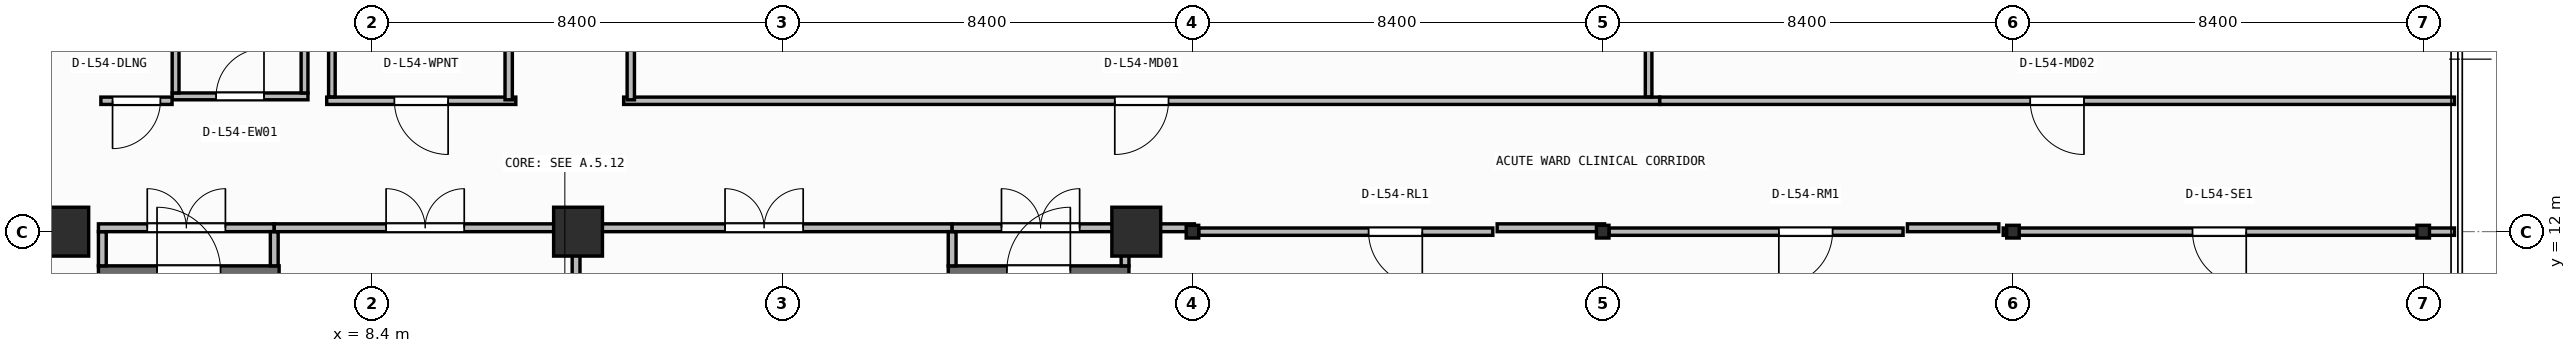
"""IFC4 building model, lengths in metres.
Left out: names, types, materials, properties, quantities, classifications, styles, units other than length and angle.
Written with IfcOpenShell. Run it as: python <this file> out.ifc"""

import sys

from ifc_helpers import new_model, si_unit, direction, frame, frame_2d, origin, origin_2d, place, context, subcontext, project, spatial, rectangle, i_section, extrude, element, fill, save


model = new_model("IFC4")
c1 = context("Model", 3, precision=1e-05, world=origin(), true_north=direction((0.0, 1.0)))
c2 = subcontext(c1, "Body", "Model", "MODEL_VIEW")
j1 = project(units=[si_unit("LENGTHUNIT", "METRE"), si_unit("PLANEANGLEUNIT", "RADIAN")], contexts=[c1])
p1 = place(None, origin())
s1 = spatial("IfcSite", under=j1, at=p1, CompositionType="ELEMENT")
p2 = place(p1, origin())
s2 = spatial("IfcBuilding", under=s1, at=p2, CompositionType="ELEMENT")
p3 = place(p2, frame((0.0, 0.0, 219.75)))
s3 = spatial("IfcBuildingStorey", under=s2, at=p3, CompositionType="ELEMENT", Elevation=219.75)
for number, where, z_axis, x_axis in (
    (1, (2.1, 12.0, 0.0), (0.0, 0.0, 1.0), (1.0, 0.0, 0.0)),
    (2, (12.62, 12.0, 0.0), (0.0, 0.0, 1.0), (1.0, 0.0, 0.0)),
    (3, (24.05, 12.0, 0.0), (0.0, 0.0, 1.0), (1.0, 0.0, 0.0)),
):
    element("IfcColumn", number, at=place(p3, frame(where, z_axis=z_axis, x_axis=x_axis)), inside=s3, PredefinedType="COLUMN", context=c2, shape_type="SweptSolid", body=[
        extrude(rectangle(XDim=1.0, YDim=1.0, at=origin_2d()), origin(), (0.0, 0.0, 1.0), 3.95),
    ])
for number, where, z_axis, x_axis in (
    (4, (25.2, 12.0, 0.0), (0.0, 0.0, 1.0), (1.0, 0.0, 0.0)),
    (5, (33.6, 12.0, 0.0), (0.0, 0.0, 1.0), (1.0, 0.0, 0.0)),
    (6, (42.0, 12.0, 0.0), (0.0, 0.0, 1.0), (1.0, 0.0, 0.0)),
    (7, (50.4, 12.0, 0.0), (0.0, 0.0, 1.0), (1.0, 0.0, 0.0)),
):
    element("IfcColumn", number, at=place(p3, frame(where, z_axis=z_axis, x_axis=x_axis)), inside=s3, PredefinedType="COLUMN", context=c2, shape_type="SweptSolid", body=[
        extrude(i_section(OverallWidth=0.256, OverallDepth=0.26, WebThickness=0.01, FlangeThickness=0.017, FilletRadius=0.013, at=origin_2d()), origin(), (0.0, 0.0, 1.0), 3.95),
    ])
p4 = place(p3, frame((2.8, 11.2, 0.0), z_axis=(0.0, 0.0, 1.0), x_axis=(1.0, 0.0, 0.0)))
e8 = element("IfcWall", 8, at=p4, inside=s3, PredefinedType="SHEAR", context=c2, shape_type="SweptSolid", body=[
    extrude(rectangle(XDim=3.7, YDim=0.2, at=frame_2d((1.85, 0.0))), origin(), (0.0, 0.0, 1.0), 3.71),
])
p5 = place(p4, frame((1.2, 0.0, 0.0)))
e9 = element("IfcOpeningElement", 9, at=p5, cuts=e8, PredefinedType="OPENING", context=c2, shape_type="SweptSolid", body=[
    extrude(rectangle(XDim=1.3, YDim=2.15, at=frame_2d((0.65, 1.075))), frame((0.0, 0.11, 0.0), z_axis=(0.0, -1.0, 0.0), x_axis=(1.0, 0.0, 0.0)), (0.0, 0.0, 1.0), 0.22),
])
p6 = place(p3, frame((20.2, 11.2, 0.0), z_axis=(0.0, 0.0, 1.0), x_axis=(1.0, 0.0, 0.0)))
e10 = element("IfcWall", 10, at=p6, inside=s3, PredefinedType="SHEAR", context=c2, shape_type="SweptSolid", body=[
    extrude(rectangle(XDim=3.7, YDim=0.2, at=frame_2d((1.85, 0.0))), origin(), (0.0, 0.0, 1.0), 3.71),
])
p7 = place(p6, frame((1.2, 0.0, 0.0)))
e11 = element("IfcOpeningElement", 11, at=p7, cuts=e10, PredefinedType="OPENING", context=c2, shape_type="SweptSolid", body=[
    extrude(rectangle(XDim=1.3, YDim=2.15, at=frame_2d((0.65, 1.075))), frame((0.0, 0.11, 0.0), z_axis=(0.0, -1.0, 0.0), x_axis=(1.0, 0.0, 0.0)), (0.0, 0.0, 1.0), 0.22),
])
p8 = place(p3, frame((2.88, 11.3, 0.0), z_axis=(0.0, 0.0, 1.0), x_axis=(0.0, 1.0, 0.0)))
e12 = element("IfcWall", 12, at=p8, inside=s3, PredefinedType="PARTITIONING", context=c2, shape_type="SweptSolid", body=[
    extrude(rectangle(XDim=0.7, YDim=0.16, at=frame_2d((0.35, 0.0))), origin(), (0.0, 0.0, 1.0), 3.71),
])
p9 = place(p3, frame((2.8, 12.08, 0.0), z_axis=(0.0, 0.0, 1.0), x_axis=(1.0, 0.0, 0.0)))
e13 = element("IfcWall", 13, at=p9, inside=s3, PredefinedType="PARTITIONING", context=c2, shape_type="SweptSolid", body=[
    extrude(rectangle(XDim=3.6, YDim=0.16, at=frame_2d((1.8, 0.0))), origin(), (0.0, 0.0, 1.0), 3.152),
])
p10 = place(p9, frame((1.0, 0.0, 0.0)))
e14 = element("IfcOpeningElement", 14, at=p10, cuts=e13, PredefinedType="OPENING", context=c2, shape_type="SweptSolid", body=[
    extrude(rectangle(XDim=1.6, YDim=2.05, at=frame_2d((0.8, 1.025))), frame((0.0, 0.09, 0.0), z_axis=(0.0, -1.0, 0.0), x_axis=(1.0, 0.0, 0.0)), (0.0, 0.0, 1.0), 0.18),
])
p11 = place(p3, frame((6.4, 11.3, 0.0), z_axis=(0.0, 0.0, 1.0), x_axis=(0.0, 1.0, 0.0)))
e15 = element("IfcWall", 15, at=p11, inside=s3, PredefinedType="PARTITIONING", context=c2, shape_type="SweptSolid", body=[
    extrude(rectangle(XDim=0.7, YDim=0.16, at=frame_2d((0.35, 0.0))), origin(), (0.0, 0.0, 1.0), 3.71),
])
p12 = place(p3, frame((6.4, 12.08, 0.0), z_axis=(0.0, 0.0, 1.0), x_axis=(1.0, 0.0, 0.0)))
e16 = element("IfcWall", 16, at=p12, inside=s3, PredefinedType="PARTITIONING", context=c2, shape_type="SweptSolid", body=[
    extrude(rectangle(XDim=6.18, YDim=0.16, at=frame_2d((3.09, 0.0))), origin(), (0.0, 0.0, 1.0), 3.152),
])
p13 = place(p12, frame((2.29, 0.0, 0.0)))
e17 = element("IfcOpeningElement", 17, at=p13, cuts=e16, PredefinedType="OPENING", context=c2, shape_type="SweptSolid", body=[
    extrude(rectangle(XDim=1.6, YDim=2.05, at=frame_2d((0.8, 1.025))), frame((0.0, 0.09, 0.0), z_axis=(0.0, -1.0, 0.0), x_axis=(1.0, 0.0, 0.0)), (0.0, 0.0, 1.0), 0.18),
])
p14 = place(p3, frame((12.58, 9.21, 0.0), z_axis=(0.0, 0.0, 1.0), x_axis=(0.0, 1.0, 0.0)))
e18 = element("IfcWall", 18, at=p14, inside=s3, PredefinedType="PARTITIONING", context=c2, shape_type="SweptSolid", body=[
    extrude(rectangle(XDim=2.79, YDim=0.16, at=frame_2d((1.395, 0.0))), origin(), (0.0, 0.0, 1.0), 3.71),
])
p15 = place(p3, frame((12.58, 12.08, 0.0), z_axis=(0.0, 0.0, 1.0), x_axis=(1.0, 0.0, 0.0)))
e19 = element("IfcWall", 19, at=p15, inside=s3, PredefinedType="PARTITIONING", context=c2, shape_type="SweptSolid", body=[
    extrude(rectangle(XDim=7.7, YDim=0.16, at=frame_2d((3.85, 0.0))), origin(), (0.0, 0.0, 1.0), 3.152),
])
p16 = place(p15, frame((3.05, 0.0, 0.0)))
e20 = element("IfcOpeningElement", 20, at=p16, cuts=e19, PredefinedType="OPENING", context=c2, shape_type="SweptSolid", body=[
    extrude(rectangle(XDim=1.6, YDim=2.05, at=frame_2d((0.8, 1.025))), frame((0.0, 0.09, 0.0), z_axis=(0.0, -1.0, 0.0), x_axis=(1.0, 0.0, 0.0)), (0.0, 0.0, 1.0), 0.18),
])
p17 = place(p3, frame((20.28, 11.3, 0.0), z_axis=(0.0, 0.0, 1.0), x_axis=(0.0, 1.0, 0.0)))
e21 = element("IfcWall", 21, at=p17, inside=s3, PredefinedType="PARTITIONING", context=c2, shape_type="SweptSolid", body=[
    extrude(rectangle(XDim=0.7, YDim=0.16, at=frame_2d((0.35, 0.0))), origin(), (0.0, 0.0, 1.0), 3.71),
])
p18 = place(p3, frame((20.28, 12.08, 0.0), z_axis=(0.0, 0.0, 1.0), x_axis=(1.0, 0.0, 0.0)))
e22 = element("IfcWall", 22, at=p18, inside=s3, PredefinedType="PARTITIONING", context=c2, shape_type="SweptSolid", body=[
    extrude(rectangle(XDim=3.62, YDim=0.16, at=frame_2d((1.81, 0.0))), origin(), (0.0, 0.0, 1.0), 3.152),
])
p19 = place(p18, frame((1.01, 0.0, 0.0)))
e23 = element("IfcOpeningElement", 23, at=p19, cuts=e22, PredefinedType="OPENING", context=c2, shape_type="SweptSolid", body=[
    extrude(rectangle(XDim=1.6, YDim=2.05, at=frame_2d((0.8, 1.025))), frame((0.0, 0.09, 0.0), z_axis=(0.0, -1.0, 0.0), x_axis=(1.0, 0.0, 0.0)), (0.0, 0.0, 1.0), 0.18),
])
p20 = place(p3, frame((23.82, 11.3, 0.0), z_axis=(0.0, 0.0, 1.0), x_axis=(0.0, 1.0, 0.0)))
e24 = element("IfcWall", 24, at=p20, inside=s3, PredefinedType="PARTITIONING", context=c2, shape_type="SweptSolid", body=[
    extrude(rectangle(XDim=0.7, YDim=0.16, at=frame_2d((0.35, 0.0))), origin(), (0.0, 0.0, 1.0), 3.71),
])
p21 = place(p3, frame((4.31, 14.77, 0.0), z_axis=(0.0, 0.0, 1.0), x_axis=(1.0, 0.0, 0.0)))
e25 = element("IfcWall", 25, at=p21, inside=s3, PredefinedType="PARTITIONING", context=c2, shape_type="SweptSolid", body=[
    extrude(rectangle(XDim=2.78, YDim=0.14, at=frame_2d((1.39, 0.0))), origin(), (0.0, 0.0, 1.0), 3.71),
])
p22 = place(p21, frame((0.9, 0.0, 0.0)))
e26 = element("IfcOpeningElement", 26, at=p22, cuts=e25, PredefinedType="OPENING", context=c2, shape_type="SweptSolid", body=[
    extrude(rectangle(XDim=0.98, YDim=2.1, at=frame_2d((0.49, 1.05))), frame((0.0, 0.08, 0.0), z_axis=(0.0, -1.0, 0.0), x_axis=(1.0, 0.0, 0.0)), (0.0, 0.0, 1.0), 0.16),
])
for number, where, z_axis, x_axis in (
    (27, (4.38, 14.84, 0.0), (0.0, 0.0, 1.0), (0.0, 1.0, 0.0)),
    (28, (7.02, 14.84, 0.0), (0.0, 0.0, 1.0), (0.0, 1.0, 0.0)),
):
    element("IfcWall", number, at=place(p3, frame(where, z_axis=z_axis, x_axis=x_axis)), inside=s3, PredefinedType="PARTITIONING", context=c2, shape_type="SweptSolid", body=[
        extrude(rectangle(XDim=2.2, YDim=0.14, at=frame_2d((1.1, 0.0))), origin(), (0.0, 0.0, 1.0), 3.71),
    ])
p23 = place(p3, frame((31.35, 12.0, 0.0), z_axis=(0.0, 0.0, 1.0), x_axis=(-1.0, 0.0, 0.0)))
e29 = element("IfcWall", 29, at=p23, inside=s3, PredefinedType="PARTITIONING", context=c2, shape_type="SweptSolid", body=[
    extrude(rectangle(XDim=6.022, YDim=0.15, at=frame_2d((3.011, 0.0))), origin(), (0.0, 0.0, 1.0), 3.152),
])
p24 = place(p23, frame((1.444, 0.0, 0.0)))
e30 = element("IfcOpeningElement", 30, at=p24, cuts=e29, PredefinedType="OPENING", context=c2, shape_type="SweptSolid", body=[
    extrude(rectangle(XDim=1.1, YDim=2.1, at=frame_2d((0.55, 1.05))), frame((0.0, 0.085, 0.0), z_axis=(0.0, -1.0, 0.0), x_axis=(1.0, 0.0, 0.0)), (0.0, 0.0, 1.0), 0.17),
])
p25 = place(p3, frame((39.75, 12.0, 0.0), z_axis=(0.0, 0.0, 1.0), x_axis=(-1.0, 0.0, 0.0)))
e31 = element("IfcWall", 31, at=p25, inside=s3, PredefinedType="PARTITIONING", context=c2, shape_type="SweptSolid", body=[
    extrude(rectangle(XDim=6.022, YDim=0.15, at=frame_2d((3.011, 0.0))), origin(), (0.0, 0.0, 1.0), 3.152),
])
p26 = place(p25, frame((1.444, 0.0, 0.0)))
e32 = element("IfcOpeningElement", 32, at=p26, cuts=e31, PredefinedType="OPENING", context=c2, shape_type="SweptSolid", body=[
    extrude(rectangle(XDim=1.1, YDim=2.1, at=frame_2d((0.55, 1.05))), frame((0.0, 0.085, 0.0), z_axis=(0.0, -1.0, 0.0), x_axis=(1.0, 0.0, 0.0)), (0.0, 0.0, 1.0), 0.17),
])
p27 = place(p3, frame((51.04, 12.0, 0.0), z_axis=(0.0, 0.0, 1.0), x_axis=(-1.0, 0.0, 0.0)))
e33 = element("IfcWall", 33, at=p27, inside=s3, PredefinedType="PARTITIONING", context=c2, shape_type="SweptSolid", body=[
    extrude(rectangle(XDim=9.24, YDim=0.15, at=frame_2d((4.62, 0.0))), origin(), (0.0, 0.0, 1.0), 3.152),
])
p28 = place(p27, frame((4.263, 0.0, 0.0)))
e34 = element("IfcOpeningElement", 34, at=p28, cuts=e33, PredefinedType="OPENING", context=c2, shape_type="SweptSolid", body=[
    extrude(rectangle(XDim=1.1, YDim=2.1, at=frame_2d((0.55, 1.05))), frame((0.0, 0.085, 0.0), z_axis=(0.0, -1.0, 0.0), x_axis=(1.0, 0.0, 0.0)), (0.0, 0.0, 1.0), 0.17),
])
p29 = place(p3, frame((4.308, 14.68, 0.0), z_axis=(0.0, 0.0, 1.0), x_axis=(-1.0, 0.0, 0.0)))
e35 = element("IfcWall", 35, at=p29, inside=s3, PredefinedType="PARTITIONING", context=c2, shape_type="SweptSolid", body=[
    extrude(rectangle(XDim=1.458, YDim=0.15, at=frame_2d((0.729, 0.0))), origin(), (0.0, 0.0, 1.0), 3.71),
])
p30 = place(p29, frame((0.239, 0.0, 0.0)))
e36 = element("IfcOpeningElement", 36, at=p30, cuts=e35, PredefinedType="OPENING", context=c2, shape_type="SweptSolid", body=[
    extrude(rectangle(XDim=0.98, YDim=2.1, at=frame_2d((0.49, 1.05))), frame((0.0, 0.085, 0.0), z_axis=(0.0, -1.0, 0.0), x_axis=(1.0, 0.0, 0.0)), (0.0, 0.0, 1.0), 0.17),
])
p31 = place(p3, frame((11.346, 14.68, 0.0), z_axis=(0.0, 0.0, 1.0), x_axis=(-1.0, 0.0, 0.0)))
e37 = element("IfcWall", 37, at=p31, inside=s3, PredefinedType="PARTITIONING", context=c2, shape_type="SweptSolid", body=[
    extrude(rectangle(XDim=3.872, YDim=0.15, at=frame_2d((1.936, 0.0))), origin(), (0.0, 0.0, 1.0), 3.71),
])
p32 = place(p31, frame((1.386, 0.0, 0.0)))
e38 = element("IfcOpeningElement", 38, at=p32, cuts=e37, PredefinedType="OPENING", context=c2, shape_type="SweptSolid", body=[
    extrude(rectangle(XDim=1.1, YDim=2.1, at=frame_2d((0.55, 1.05))), frame((0.0, 0.085, 0.0), z_axis=(0.0, -1.0, 0.0), x_axis=(1.0, 0.0, 0.0)), (0.0, 0.0, 1.0), 0.17),
])
p33 = place(p3, frame((34.766, 14.68, 0.0), z_axis=(0.0, 0.0, 1.0), x_axis=(-1.0, 0.0, 0.0)))
e39 = element("IfcWall", 39, at=p33, inside=s3, PredefinedType="PARTITIONING", context=c2, shape_type="SweptSolid", body=[
    extrude(rectangle(XDim=21.212, YDim=0.15, at=frame_2d((10.606, 0.0))), origin(), (0.0, 0.0, 1.0), 3.71),
])
p34 = place(p33, frame((10.056, 0.0, 0.0)))
e40 = element("IfcOpeningElement", 40, at=p34, cuts=e39, PredefinedType="OPENING", context=c2, shape_type="SweptSolid", body=[
    extrude(rectangle(XDim=1.1, YDim=2.1, at=frame_2d((0.55, 1.05))), frame((0.0, 0.085, 0.0), z_axis=(0.0, -1.0, 0.0), x_axis=(1.0, 0.0, 0.0)), (0.0, 0.0, 1.0), 0.17),
])
p35 = place(p3, frame((51.04, 14.68, 0.0), z_axis=(0.0, 0.0, 1.0), x_axis=(-1.0, 0.0, 0.0)))
e41 = element("IfcWall", 41, at=p35, inside=s3, PredefinedType="PARTITIONING", context=c2, shape_type="SweptSolid", body=[
    extrude(rectangle(XDim=16.272, YDim=0.15, at=frame_2d((8.136, 0.0))), origin(), (0.0, 0.0, 1.0), 3.71),
])
p36 = place(p35, frame((7.586, 0.0, 0.0)))
e42 = element("IfcOpeningElement", 42, at=p36, cuts=e41, PredefinedType="OPENING", context=c2, shape_type="SweptSolid", body=[
    extrude(rectangle(XDim=1.1, YDim=2.1, at=frame_2d((0.55, 1.05))), frame((0.0, 0.085, 0.0), z_axis=(0.0, -1.0, 0.0), x_axis=(1.0, 0.0, 0.0)), (0.0, 0.0, 1.0), 0.17),
])
p37 = place(p3, frame((11.2, 26.6, 0.0), z_axis=(0.0, 0.0, 1.0), x_axis=(0.0, -1.0, 0.0)))
e43 = element("IfcWall", 43, at=p37, inside=s3, PredefinedType="PARTITIONING", context=c2, shape_type="SweptSolid", body=[
    extrude(rectangle(XDim=11.9, YDim=0.15, at=frame_2d((5.95, 0.0))), origin(), (0.0, 0.0, 1.0), 3.71),
])
p38 = place(p3, frame((13.7, 14.7, 0.0), z_axis=(0.0, 0.0, 1.0), x_axis=(0.0, 1.0, 0.0)))
e44 = element("IfcWall", 44, at=p38, inside=s3, PredefinedType="PARTITIONING", context=c2, shape_type="SweptSolid", body=[
    extrude(rectangle(XDim=5.326, YDim=0.15, at=frame_2d((2.663, 0.0))), origin(), (0.0, 0.0, 1.0), 3.71),
])
p39 = place(p3, frame((7.58, 14.76, 0.0), z_axis=(0.0, 0.0, 1.0), x_axis=(0.0, 1.0, 0.0)))
e45 = element("IfcWall", 45, at=p39, inside=s3, PredefinedType="PARTITIONING", context=c2, shape_type="SweptSolid", body=[
    extrude(rectangle(XDim=11.76, YDim=0.135, at=frame_2d((5.88, 0.0))), origin(), (0.0, 0.0, 1.0), 3.71),
])
p40 = place(p3, frame((34.54, 14.76, 0.0), z_axis=(0.0, 0.0, 1.0), x_axis=(0.0, 1.0, 0.0)))
e46 = element("IfcWall", 46, at=p40, inside=s3, PredefinedType="PARTITIONING", context=c2, shape_type="SweptSolid", body=[
    extrude(rectangle(XDim=5.04, YDim=0.135, at=frame_2d((2.52, 0.0))), origin(), (0.0, 0.0, 1.0), 3.71),
])
p41 = place(p3, frame((24.02, 12.08, 0.0), z_axis=(0.0, 0.0, 1.0), x_axis=(1.0, 0.0, 0.0)))
e47 = element("IfcWall", 47, at=p41, inside=s3, PredefinedType="PARTITIONING", context=c2, shape_type="SweptSolid", body=[
    extrude(rectangle(XDim=1.219, YDim=0.16, at=frame_2d((0.609, 0.0))), origin(), (0.0, 0.0, 1.0), 3.152),
])
p42 = place(p3, frame((31.439, 12.08, 0.0), z_axis=(0.0, 0.0, 1.0), x_axis=(1.0, 0.0, 0.0)))
e48 = element("IfcWall", 48, at=p42, inside=s3, PredefinedType="PARTITIONING", context=c2, shape_type="SweptSolid", body=[
    extrude(rectangle(XDim=2.199, YDim=0.16, at=frame_2d((1.1, 0.0))), origin(), (0.0, 0.0, 1.0), 3.152),
])
p43 = place(p3, frame((39.839, 12.08, 0.0), z_axis=(0.0, 0.0, 1.0), x_axis=(1.0, 0.0, 0.0)))
e49 = element("IfcWall", 49, at=p43, inside=s3, PredefinedType="PARTITIONING", context=c2, shape_type="SweptSolid", body=[
    extrude(rectangle(XDim=1.871, YDim=0.16, at=frame_2d((0.936, 0.0))), origin(), (0.0, 0.0, 1.0), 3.152),
])
p44 = place(p5, origin())
e50 = element("IfcDoor", 50, at=p44, inside=s3, OperationType="SINGLE_SWING_LEFT", PredefinedType="DOOR", context=c2, shape_type="SweptSolid", body=[
    extrude(rectangle(XDim=1.3, YDim=2.15, at=frame_2d((0.65, 1.075))), frame((0.0, 0.025, 0.0), z_axis=(0.0, -1.0, 0.0), x_axis=(1.0, 0.0, 0.0)), (0.0, 0.0, 1.0), 0.05),
])
fill(e9, e50)
p45 = place(p7, origin())
e51 = element("IfcDoor", 51, at=p45, inside=s3, OperationType="SINGLE_SWING_RIGHT", PredefinedType="DOOR", context=c2, shape_type="SweptSolid", body=[
    extrude(rectangle(XDim=1.3, YDim=2.15, at=frame_2d((0.65, 1.075))), frame((0.0, 0.025, 0.0), z_axis=(0.0, -1.0, 0.0), x_axis=(1.0, 0.0, 0.0)), (0.0, 0.0, 1.0), 0.05),
])
fill(e11, e51)
p46 = place(p10, origin())
e52 = element("IfcDoor", 52, at=p46, inside=s3, OperationType="DOUBLE_DOOR_SINGLE_SWING", PredefinedType="DOOR", context=c2, shape_type="SweptSolid", body=[
    extrude(rectangle(XDim=1.6, YDim=2.05, at=frame_2d((0.8, 1.025))), frame((0.0, 0.025, 0.0), z_axis=(0.0, -1.0, 0.0), x_axis=(1.0, 0.0, 0.0)), (0.0, 0.0, 1.0), 0.05),
])
fill(e14, e52)
p47 = place(p13, origin())
e53 = element("IfcDoor", 53, at=p47, inside=s3, OperationType="DOUBLE_DOOR_SINGLE_SWING", PredefinedType="DOOR", context=c2, shape_type="SweptSolid", body=[
    extrude(rectangle(XDim=1.6, YDim=2.05, at=frame_2d((0.8, 1.025))), frame((0.0, 0.025, 0.0), z_axis=(0.0, -1.0, 0.0), x_axis=(1.0, 0.0, 0.0)), (0.0, 0.0, 1.0), 0.05),
])
fill(e17, e53)
p48 = place(p16, origin())
e54 = element("IfcDoor", 54, at=p48, inside=s3, OperationType="DOUBLE_DOOR_SINGLE_SWING", PredefinedType="DOOR", context=c2, shape_type="SweptSolid", body=[
    extrude(rectangle(XDim=1.6, YDim=2.05, at=frame_2d((0.8, 1.025))), frame((0.0, 0.025, 0.0), z_axis=(0.0, -1.0, 0.0), x_axis=(1.0, 0.0, 0.0)), (0.0, 0.0, 1.0), 0.05),
])
fill(e20, e54)
p49 = place(p19, origin())
e55 = element("IfcDoor", 55, at=p49, inside=s3, OperationType="DOUBLE_DOOR_SINGLE_SWING", PredefinedType="DOOR", context=c2, shape_type="SweptSolid", body=[
    extrude(rectangle(XDim=1.6, YDim=2.05, at=frame_2d((0.8, 1.025))), frame((0.0, 0.025, 0.0), z_axis=(0.0, -1.0, 0.0), x_axis=(1.0, 0.0, 0.0)), (0.0, 0.0, 1.0), 0.05),
])
fill(e23, e55)
p50 = place(p22, origin())
e56 = element("IfcDoor", 56, at=p50, inside=s3, OperationType="SINGLE_SWING_RIGHT", PredefinedType="DOOR", context=c2, shape_type="SweptSolid", body=[
    extrude(rectangle(XDim=0.98, YDim=2.1, at=frame_2d((0.49, 1.05))), frame((0.0, 0.025, 0.0), z_axis=(0.0, -1.0, 0.0), x_axis=(1.0, 0.0, 0.0)), (0.0, 0.0, 1.0), 0.05),
])
fill(e26, e56)
p51 = place(p24, origin())
e57 = element("IfcDoor", 57, at=p51, inside=s3, OperationType="SINGLE_SWING_LEFT", PredefinedType="DOOR", context=c2, shape_type="SweptSolid", body=[
    extrude(rectangle(XDim=1.1, YDim=2.1, at=frame_2d((0.55, 1.05))), frame((0.0, 0.025, 0.0), z_axis=(0.0, -1.0, 0.0), x_axis=(1.0, 0.0, 0.0)), (0.0, 0.0, 1.0), 0.05),
])
fill(e30, e57)
p52 = place(p26, origin())
e58 = element("IfcDoor", 58, at=p52, inside=s3, OperationType="SINGLE_SWING_RIGHT", PredefinedType="DOOR", context=c2, shape_type="SweptSolid", body=[
    extrude(rectangle(XDim=1.1, YDim=2.1, at=frame_2d((0.55, 1.05))), frame((0.0, 0.025, 0.0), z_axis=(0.0, -1.0, 0.0), x_axis=(1.0, 0.0, 0.0)), (0.0, 0.0, 1.0), 0.05),
])
fill(e32, e58)
p53 = place(p28, origin())
e59 = element("IfcDoor", 59, at=p53, inside=s3, OperationType="SINGLE_SWING_LEFT", PredefinedType="DOOR", context=c2, shape_type="SweptSolid", body=[
    extrude(rectangle(XDim=1.1, YDim=2.1, at=frame_2d((0.55, 1.05))), frame((0.0, 0.025, 0.0), z_axis=(0.0, -1.0, 0.0), x_axis=(1.0, 0.0, 0.0)), (0.0, 0.0, 1.0), 0.05),
])
fill(e34, e59)
p54 = place(p30, origin())
e60 = element("IfcDoor", 60, at=p54, inside=s3, OperationType="SINGLE_SWING_RIGHT", PredefinedType="DOOR", context=c2, shape_type="SweptSolid", body=[
    extrude(rectangle(XDim=0.98, YDim=2.1, at=frame_2d((0.49, 1.05))), frame((0.0, 0.025, 0.0), z_axis=(0.0, -1.0, 0.0), x_axis=(1.0, 0.0, 0.0)), (0.0, 0.0, 1.0), 0.05),
])
fill(e36, e60)
p55 = place(p32, origin())
e61 = element("IfcDoor", 61, at=p55, inside=s3, OperationType="SINGLE_SWING_LEFT", PredefinedType="DOOR", context=c2, shape_type="SweptSolid", body=[
    extrude(rectangle(XDim=1.1, YDim=2.1, at=frame_2d((0.55, 1.05))), frame((0.0, 0.025, 0.0), z_axis=(0.0, -1.0, 0.0), x_axis=(1.0, 0.0, 0.0)), (0.0, 0.0, 1.0), 0.05),
])
fill(e38, e61)
p56 = place(p34, origin())
e62 = element("IfcDoor", 62, at=p56, inside=s3, OperationType="SINGLE_SWING_RIGHT", PredefinedType="DOOR", context=c2, shape_type="SweptSolid", body=[
    extrude(rectangle(XDim=1.1, YDim=2.1, at=frame_2d((0.55, 1.05))), frame((0.0, 0.025, 0.0), z_axis=(0.0, -1.0, 0.0), x_axis=(1.0, 0.0, 0.0)), (0.0, 0.0, 1.0), 0.05),
])
fill(e40, e62)
p57 = place(p36, origin())
e63 = element("IfcDoor", 63, at=p57, inside=s3, OperationType="SINGLE_SWING_LEFT", PredefinedType="DOOR", context=c2, shape_type="SweptSolid", body=[
    extrude(rectangle(XDim=1.1, YDim=2.1, at=frame_2d((0.55, 1.05))), frame((0.0, 0.025, 0.0), z_axis=(0.0, -1.0, 0.0), x_axis=(1.0, 0.0, 0.0)), (0.0, 0.0, 1.0), 0.05),
])
fill(e42, e63)
save(model, sys.argv[1])
